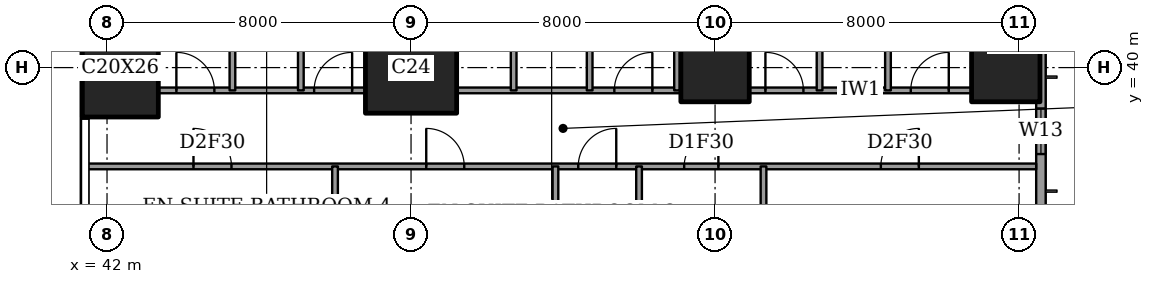
"""IFC4 building model, lengths in metres.
Left out: names, types, materials, properties, quantities, classifications, styles, units other than length and angle.
Written with IfcOpenShell. Run it as: python <this file> out.ifc"""

import sys

from ifc_helpers import new_model, si_unit, direction, frame, frame_2d, origin, origin_2d, place, context, subcontext, project, spatial, rectangle, extrude, element, fill, save


model = new_model("IFC4")
c1 = context("Model", 3, precision=1e-05, world=origin(), true_north=direction((0.0, 1.0)))
c2 = subcontext(c1, "Body", "Model", "MODEL_VIEW")
j1 = project(units=[si_unit("LENGTHUNIT", "METRE"), si_unit("PLANEANGLEUNIT", "RADIAN")], contexts=[c1])
p1 = place(None, origin())
s1 = spatial("IfcSite", under=j1, at=p1, CompositionType="ELEMENT")
p2 = place(p1, origin())
s2 = spatial("IfcBuilding", under=s1, at=p2, CompositionType="ELEMENT")
p3 = place(p2, frame((0.0, 0.0, 193.0)))
s3 = spatial("IfcBuildingStorey", under=s2, at=p3, CompositionType="ELEMENT", Elevation=193.0)
p4 = place(p3, frame((42.35, 40.0, 0.0), z_axis=(0.0, 0.0, 1.0), x_axis=(1.0, 0.0, 0.0)))
e1 = element("IfcColumn", 1, at=p4, inside=s3, PredefinedType="COLUMN", context=c2, shape_type="SweptSolid", body=[
    extrude(rectangle(XDim=2.0, YDim=2.6, at=origin_2d()), origin(), (0.0, 0.0, 1.0), 3.6),
])
p5 = place(p3, frame((50.0, 40.0, 0.0), z_axis=(0.0, 0.0, 1.0), x_axis=(1.0, 0.0, 0.0)))
e2 = element("IfcColumn", 2, at=p5, inside=s3, PredefinedType="COLUMN", context=c2, shape_type="SweptSolid", body=[
    extrude(rectangle(XDim=2.4, YDim=2.4, at=origin_2d()), origin(), (0.0, 0.0, 1.0), 3.6),
])
for number, where, z_axis, x_axis in (
    (3, (58.0, 40.0, 0.0), (0.0, 0.0, 1.0), (1.0, 0.0, 0.0)),
    (4, (65.65, 40.0, 0.0), (0.0, 0.0, 1.0), (1.0, 0.0, 0.0)),
):
    element("IfcColumn", number, at=place(p3, frame(where, z_axis=z_axis, x_axis=x_axis)), inside=s3, PredefinedType="COLUMN", context=c2, shape_type="SweptSolid", body=[
        extrude(rectangle(XDim=1.8, YDim=1.8, at=origin_2d()), origin(), (0.0, 0.0, 1.0), 3.6),
    ])
p6 = place(p3, frame((66.575, 3.175, 0.0), z_axis=(0.0, 0.0, 1.0), x_axis=(0.0, 1.0, 0.0)))
e5 = element("IfcWall", 5, at=p6, inside=s3, PredefinedType="SOLIDWALL", context=c2, shape_type="SweptSolid", body=[
    extrude(rectangle(XDim=41.65, YDim=0.25, at=frame_2d((20.825, 0.0))), origin(), (0.0, 0.0, 1.0), 3.6),
])
p7 = place(p6, frame((0.825, 0.0, 0.2)))
e6 = element("IfcOpeningElement", 6, at=p7, cuts=e5, PredefinedType="OPENING", context=c2, shape_type="SweptSolid", body=[
    extrude(rectangle(XDim=2.4, YDim=2.4, at=frame_2d((1.2, 1.2))), frame((0.0, 0.135, 0.0), z_axis=(0.0, -1.0, 0.0), x_axis=(1.0, 0.0, 0.0)), (0.0, 0.0, 1.0), 0.27),
])
p8 = place(p6, frame((6.05, 0.0, 0.2)))
e7 = element("IfcOpeningElement", 7, at=p8, cuts=e5, PredefinedType="OPENING", context=c2, shape_type="SweptSolid", body=[
    extrude(rectangle(XDim=1.2, YDim=2.4, at=frame_2d((0.6, 1.2))), frame((0.0, 0.135, 0.0), z_axis=(0.0, -1.0, 0.0), x_axis=(1.0, 0.0, 0.0)), (0.0, 0.0, 1.0), 0.27),
])
p9 = place(p6, frame((8.475, 0.0, 0.2)))
e8 = element("IfcOpeningElement", 8, at=p9, cuts=e5, PredefinedType="OPENING", context=c2, shape_type="SweptSolid", body=[
    extrude(rectangle(XDim=2.4, YDim=2.4, at=frame_2d((1.2, 1.2))), frame((0.0, 0.135, 0.0), z_axis=(0.0, -1.0, 0.0), x_axis=(1.0, 0.0, 0.0)), (0.0, 0.0, 1.0), 0.27),
])
p10 = place(p6, frame((15.675, 0.0, 0.2)))
e9 = element("IfcOpeningElement", 9, at=p10, cuts=e5, PredefinedType="OPENING", context=c2, shape_type="SweptSolid", body=[
    extrude(rectangle(XDim=2.4, YDim=2.4, at=frame_2d((1.2, 1.2))), frame((0.0, 0.135, 0.0), z_axis=(0.0, -1.0, 0.0), x_axis=(1.0, 0.0, 0.0)), (0.0, 0.0, 1.0), 0.27),
])
p11 = place(p6, frame((23.625, 0.0, 0.2)))
e10 = element("IfcOpeningElement", 10, at=p11, cuts=e5, PredefinedType="OPENING", context=c2, shape_type="SweptSolid", body=[
    extrude(rectangle(XDim=2.4, YDim=2.4, at=frame_2d((1.2, 1.2))), frame((0.0, 0.135, 0.0), z_axis=(0.0, -1.0, 0.0), x_axis=(1.0, 0.0, 0.0)), (0.0, 0.0, 1.0), 0.27),
])
p12 = place(p6, frame((30.775, 0.0, 0.2)))
e11 = element("IfcOpeningElement", 11, at=p12, cuts=e5, PredefinedType="OPENING", context=c2, shape_type="SweptSolid", body=[
    extrude(rectangle(XDim=2.4, YDim=2.4, at=frame_2d((1.2, 1.2))), frame((0.0, 0.135, 0.0), z_axis=(0.0, -1.0, 0.0), x_axis=(1.0, 0.0, 0.0)), (0.0, 0.0, 1.0), 0.27),
])
p13 = place(p6, frame((34.55, 0.0, 0.2)))
e12 = element("IfcOpeningElement", 12, at=p13, cuts=e5, PredefinedType="OPENING", context=c2, shape_type="SweptSolid", body=[
    extrude(rectangle(XDim=1.2, YDim=2.4, at=frame_2d((0.6, 1.2))), frame((0.0, 0.135, 0.0), z_axis=(0.0, -1.0, 0.0), x_axis=(1.0, 0.0, 0.0)), (0.0, 0.0, 1.0), 0.27),
])
p14 = place(p6, frame((38.425, 0.0, 0.2)))
e13 = element("IfcOpeningElement", 13, at=p14, cuts=e5, PredefinedType="OPENING", context=c2, shape_type="SweptSolid", body=[
    extrude(rectangle(XDim=2.4, YDim=2.4, at=frame_2d((1.2, 1.2))), frame((0.0, 0.135, 0.0), z_axis=(0.0, -1.0, 0.0), x_axis=(1.0, 0.0, 0.0)), (0.0, 0.0, 1.0), 0.27),
])
p15 = place(p3, frame((41.439, 37.4, 0.0), z_axis=(0.0, 0.0, 1.0), x_axis=(1.0, 0.0, 0.0)))
e14 = element("IfcWall", 14, at=p15, inside=s3, PredefinedType="PARTITIONING", context=c2, shape_type="SweptSolid", body=[
    extrude(rectangle(XDim=25.011, YDim=0.15, at=frame_2d((12.505, 0.0))), origin(), (0.0, 0.0, 1.0), 3.35),
])
p16 = place(p15, frame((12.961, 0.0, 0.0)))
e15 = element("IfcOpeningElement", 15, at=p16, cuts=e14, PredefinedType="OPENING", context=c2, shape_type="SweptSolid", body=[
    extrude(rectangle(XDim=1.0, YDim=2.1, at=frame_2d((0.5, 1.05))), frame((0.0, 0.085, 0.0), z_axis=(0.0, -1.0, 0.0), x_axis=(1.0, 0.0, 0.0)), (0.0, 0.0, 1.0), 0.17),
])
p17 = place(p15, frame((20.924, 0.0, 0.0)))
e16 = element("IfcOpeningElement", 16, at=p17, cuts=e14, PredefinedType="OPENING", context=c2, shape_type="SweptSolid", body=[
    extrude(rectangle(XDim=1.0, YDim=2.1, at=frame_2d((0.5, 1.05))), frame((0.0, 0.085, 0.0), z_axis=(0.0, -1.0, 0.0), x_axis=(1.0, 0.0, 0.0)), (0.0, 0.0, 1.0), 0.17),
])
p18 = place(p15, frame((15.749, 0.0, 0.0)))
e17 = element("IfcOpeningElement", 17, at=p18, cuts=e14, PredefinedType="OPENING", context=c2, shape_type="SweptSolid", body=[
    extrude(rectangle(XDim=0.9, YDim=2.1, at=frame_2d((0.45, 1.05))), frame((0.0, 0.085, 0.0), z_axis=(0.0, -1.0, 0.0), x_axis=(1.0, 0.0, 0.0)), (0.0, 0.0, 1.0), 0.17),
])
p19 = place(p15, frame((8.961, 0.0, 0.0)))
e18 = element("IfcOpeningElement", 18, at=p19, cuts=e14, PredefinedType="OPENING", context=c2, shape_type="SweptSolid", body=[
    extrude(rectangle(XDim=1.0, YDim=2.1, at=frame_2d((0.5, 1.05))), frame((0.0, 0.085, 0.0), z_axis=(0.0, -1.0, 0.0), x_axis=(1.0, 0.0, 0.0)), (0.0, 0.0, 1.0), 0.17),
])
p20 = place(p15, frame((2.836, 0.0, 0.0)))
e19 = element("IfcOpeningElement", 19, at=p20, cuts=e14, PredefinedType="OPENING", context=c2, shape_type="SweptSolid", body=[
    extrude(rectangle(XDim=1.0, YDim=2.1, at=frame_2d((0.5, 1.05))), frame((0.0, 0.085, 0.0), z_axis=(0.0, -1.0, 0.0), x_axis=(1.0, 0.0, 0.0)), (0.0, 0.0, 1.0), 0.17),
])
p21 = place(p3, frame((43.35, 39.4, 0.0), z_axis=(0.0, 0.0, 1.0), x_axis=(1.0, 0.0, 0.0)))
e20 = element("IfcWall", 20, at=p21, inside=s3, PredefinedType="PARTITIONING", context=c2, shape_type="SweptSolid", body=[
    extrude(rectangle(XDim=5.45, YDim=0.15, at=frame_2d((2.725, 0.0))), origin(), (0.0, 0.0, 1.0), 3.35),
])
p22 = place(p21, frame((4.1, 0.0, 0.0)))
e21 = element("IfcOpeningElement", 21, at=p22, cuts=e20, PredefinedType="OPENING", context=c2, shape_type="SweptSolid", body=[
    extrude(rectangle(XDim=1.0, YDim=2.1, at=frame_2d((0.5, 1.05))), frame((0.0, 0.085, 0.0), z_axis=(0.0, -1.0, 0.0), x_axis=(1.0, 0.0, 0.0)), (0.0, 0.0, 1.0), 0.17),
])
p23 = place(p21, frame((0.475, 0.0, 0.0)))
e22 = element("IfcOpeningElement", 22, at=p23, cuts=e20, PredefinedType="OPENING", context=c2, shape_type="SweptSolid", body=[
    extrude(rectangle(XDim=1.0, YDim=2.1, at=frame_2d((0.5, 1.05))), frame((0.0, 0.085, 0.0), z_axis=(0.0, -1.0, 0.0), x_axis=(1.0, 0.0, 0.0)), (0.0, 0.0, 1.0), 0.17),
])
p24 = place(p3, frame((51.2, 39.4, 0.0), z_axis=(0.0, 0.0, 1.0), x_axis=(1.0, 0.0, 0.0)))
e23 = element("IfcWall", 23, at=p24, inside=s3, PredefinedType="PARTITIONING", context=c2, shape_type="SweptSolid", body=[
    extrude(rectangle(XDim=5.9, YDim=0.15, at=frame_2d((2.95, 0.0))), origin(), (0.0, 0.0, 1.0), 3.35),
])
p25 = place(p24, frame((4.15, 0.0, 0.0)))
e24 = element("IfcOpeningElement", 24, at=p25, cuts=e23, PredefinedType="OPENING", context=c2, shape_type="SweptSolid", body=[
    extrude(rectangle(XDim=1.0, YDim=2.1, at=frame_2d((0.5, 1.05))), frame((0.0, 0.085, 0.0), z_axis=(0.0, -1.0, 0.0), x_axis=(1.0, 0.0, 0.0)), (0.0, 0.0, 1.0), 0.17),
])
p26 = place(p3, frame((58.9, 39.4, 0.0), z_axis=(0.0, 0.0, 1.0), x_axis=(1.0, 0.0, 0.0)))
e25 = element("IfcWall", 25, at=p26, inside=s3, PredefinedType="PARTITIONING", context=c2, shape_type="SweptSolid", body=[
    extrude(rectangle(XDim=5.85, YDim=0.15, at=frame_2d((2.925, 0.0))), origin(), (0.0, 0.0, 1.0), 3.35),
])
p27 = place(p26, frame((4.25, 0.0, 0.0)))
e26 = element("IfcOpeningElement", 26, at=p27, cuts=e25, PredefinedType="OPENING", context=c2, shape_type="SweptSolid", body=[
    extrude(rectangle(XDim=1.0, YDim=2.1, at=frame_2d((0.5, 1.05))), frame((0.0, 0.085, 0.0), z_axis=(0.0, -1.0, 0.0), x_axis=(1.0, 0.0, 0.0)), (0.0, 0.0, 1.0), 0.17),
])
p28 = place(p26, frame((0.425, 0.0, 0.0)))
e27 = element("IfcOpeningElement", 27, at=p28, cuts=e25, PredefinedType="OPENING", context=c2, shape_type="SweptSolid", body=[
    extrude(rectangle(XDim=1.0, YDim=2.1, at=frame_2d((0.5, 1.05))), frame((0.0, 0.085, 0.0), z_axis=(0.0, -1.0, 0.0), x_axis=(1.0, 0.0, 0.0)), (0.0, 0.0, 1.0), 0.17),
])
p29 = place(p3, frame((45.3, 39.4, 0.0), z_axis=(0.0, 0.0, 1.0), x_axis=(0.0, 1.0, 0.0)))
e28 = element("IfcWall", 28, at=p29, inside=s3, PredefinedType="PARTITIONING", context=c2, shape_type="SweptSolid", body=[
    extrude(rectangle(XDim=9.05, YDim=0.15, at=frame_2d((4.525, 0.0))), origin(), (0.0, 0.0, 1.0), 3.35),
])
p30 = place(p3, frame((47.1, 39.4, 0.0), z_axis=(0.0, 0.0, 1.0), x_axis=(0.0, 1.0, 0.0)))
e29 = element("IfcWall", 29, at=p30, inside=s3, PredefinedType="PARTITIONING", context=c2, shape_type="SweptSolid", body=[
    extrude(rectangle(XDim=3.5, YDim=0.15, at=frame_2d((1.75, 0.0))), origin(), (0.0, 0.0, 1.0), 3.35),
])
p31 = place(p30, frame((1.3, 0.0, 0.0)))
e30 = element("IfcOpeningElement", 30, at=p31, cuts=e29, PredefinedType="OPENING", context=c2, shape_type="SweptSolid", body=[
    extrude(rectangle(XDim=0.9, YDim=2.1, at=frame_2d((0.45, 1.05))), frame((0.0, 0.085, 0.0), z_axis=(0.0, -1.0, 0.0), x_axis=(1.0, 0.0, 0.0)), (0.0, 0.0, 1.0), 0.17),
])
p32 = place(p3, frame((48.0, 28.0, 0.0), z_axis=(0.0, 0.0, 1.0), x_axis=(0.0, 1.0, 0.0)))
e31 = element("IfcWall", 31, at=p32, inside=s3, PredefinedType="PARTITIONING", context=c2, shape_type="SweptSolid", body=[
    extrude(rectangle(XDim=9.4, YDim=0.15, at=frame_2d((4.7, 0.0))), origin(), (0.0, 0.0, 1.0), 3.35),
])
p33 = place(p32, frame((0.837, 0.0, 0.0)))
e32 = element("IfcOpeningElement", 32, at=p33, cuts=e31, PredefinedType="OPENING", context=c2, shape_type="SweptSolid", body=[
    extrude(rectangle(XDim=1.0, YDim=2.1, at=frame_2d((0.5, 1.05))), frame((0.0, 0.085, 0.0), z_axis=(0.0, -1.0, 0.0), x_axis=(1.0, 0.0, 0.0)), (0.0, 0.0, 1.0), 0.17),
])
p34 = place(p3, frame((52.7, 39.4, 0.0), z_axis=(0.0, 0.0, 1.0), x_axis=(0.0, 1.0, 0.0)))
e33 = element("IfcWall", 33, at=p34, inside=s3, PredefinedType="PARTITIONING", context=c2, shape_type="SweptSolid", body=[
    extrude(rectangle(XDim=9.05, YDim=0.15, at=frame_2d((4.525, 0.0))), origin(), (0.0, 0.0, 1.0), 3.35),
])
p35 = place(p34, frame((5.675, 0.0, 0.0)))
e34 = element("IfcOpeningElement", 34, at=p35, cuts=e33, PredefinedType="OPENING", context=c2, shape_type="SweptSolid", body=[
    extrude(rectangle(XDim=0.9, YDim=2.1, at=frame_2d((0.45, 1.05))), frame((0.0, 0.085, 0.0), z_axis=(0.0, -1.0, 0.0), x_axis=(1.0, 0.0, 0.0)), (0.0, 0.0, 1.0), 0.17),
])
p36 = place(p3, frame((53.8, 30.675, 0.0), z_axis=(0.0, 0.0, 1.0), x_axis=(0.0, 1.0, 0.0)))
e35 = element("IfcWall", 35, at=p36, inside=s3, PredefinedType="PARTITIONING", context=c2, shape_type="SweptSolid", body=[
    extrude(rectangle(XDim=6.725, YDim=0.15, at=frame_2d((3.362, 0.0))), origin(), (0.0, 0.0, 1.0), 3.35),
])
p37 = place(p3, frame((54.7, 39.4, 0.0), z_axis=(0.0, 0.0, 1.0), x_axis=(0.0, 1.0, 0.0)))
e36 = element("IfcWall", 36, at=p37, inside=s3, PredefinedType="PARTITIONING", context=c2, shape_type="SweptSolid", body=[
    extrude(rectangle(XDim=3.2, YDim=0.15, at=frame_2d((1.6, 0.0))), origin(), (0.0, 0.0, 1.0), 3.35),
])
p38 = place(p37, frame((1.15, 0.0, 0.0)))
e37 = element("IfcOpeningElement", 37, at=p38, cuts=e36, PredefinedType="OPENING", context=c2, shape_type="SweptSolid", body=[
    extrude(rectangle(XDim=0.9, YDim=2.1, at=frame_2d((0.45, 1.05))), frame((0.0, 0.085, 0.0), z_axis=(0.0, -1.0, 0.0), x_axis=(1.0, 0.0, 0.0)), (0.0, 0.0, 1.0), 0.17),
])
p39 = place(p3, frame((56.0, 28.0, 0.0), z_axis=(0.0, 0.0, 1.0), x_axis=(0.0, 1.0, 0.0)))
e38 = element("IfcWall", 38, at=p39, inside=s3, PredefinedType="PARTITIONING", context=c2, shape_type="SweptSolid", body=[
    extrude(rectangle(XDim=9.4, YDim=0.15, at=frame_2d((4.7, 0.0))), origin(), (0.0, 0.0, 1.0), 3.35),
])
p40 = place(p39, frame((0.837, 0.0, 0.0)))
e39 = element("IfcOpeningElement", 39, at=p40, cuts=e38, PredefinedType="OPENING", context=c2, shape_type="SweptSolid", body=[
    extrude(rectangle(XDim=1.0, YDim=2.1, at=frame_2d((0.5, 1.05))), frame((0.0, 0.085, 0.0), z_axis=(0.0, -1.0, 0.0), x_axis=(1.0, 0.0, 0.0)), (0.0, 0.0, 1.0), 0.17),
])
p41 = place(p3, frame((57.0, 39.4, 0.0), z_axis=(0.0, 0.0, 1.0), x_axis=(0.0, 1.0, 0.0)))
e40 = element("IfcWall", 40, at=p41, inside=s3, PredefinedType="PARTITIONING", context=c2, shape_type="SweptSolid", body=[
    extrude(rectangle(XDim=9.05, YDim=0.15, at=frame_2d((4.525, 0.0))), origin(), (0.0, 0.0, 1.0), 3.35),
])
p42 = place(p3, frame((59.275, 33.2, 0.0), z_axis=(0.0, 0.0, 1.0), x_axis=(0.0, 1.0, 0.0)))
e41 = element("IfcWall", 41, at=p42, inside=s3, PredefinedType="PARTITIONING", context=c2, shape_type="SweptSolid", body=[
    extrude(rectangle(XDim=4.2, YDim=0.15, at=frame_2d((2.1, 0.0))), origin(), (0.0, 0.0, 1.0), 3.35),
])
p43 = place(p3, frame((60.75, 39.4, 0.0), z_axis=(0.0, 0.0, 1.0), x_axis=(0.0, 1.0, 0.0)))
e42 = element("IfcWall", 42, at=p43, inside=s3, PredefinedType="PARTITIONING", context=c2, shape_type="SweptSolid", body=[
    extrude(rectangle(XDim=9.05, YDim=0.15, at=frame_2d((4.525, 0.0))), origin(), (0.0, 0.0, 1.0), 3.35),
])
p44 = place(p3, frame((62.55, 39.4, 0.0), z_axis=(0.0, 0.0, 1.0), x_axis=(0.0, 1.0, 0.0)))
e43 = element("IfcWall", 43, at=p44, inside=s3, PredefinedType="PARTITIONING", context=c2, shape_type="SweptSolid", body=[
    extrude(rectangle(XDim=3.5, YDim=0.15, at=frame_2d((1.75, 0.0))), origin(), (0.0, 0.0, 1.0), 3.35),
])
p45 = place(p44, frame((1.3, 0.0, 0.0)))
e44 = element("IfcOpeningElement", 44, at=p45, cuts=e43, PredefinedType="OPENING", context=c2, shape_type="SweptSolid", body=[
    extrude(rectangle(XDim=0.9, YDim=2.1, at=frame_2d((0.45, 1.05))), frame((0.0, 0.085, 0.0), z_axis=(0.0, -1.0, 0.0), x_axis=(1.0, 0.0, 0.0)), (0.0, 0.0, 1.0), 0.17),
])
p46 = place(p13, origin())
e45 = element("IfcWindow", 45, at=p46, inside=s3, PartitioningType="SINGLE_PANEL", PredefinedType="WINDOW", context=c2, shape_type="SweptSolid", body=[
    extrude(rectangle(XDim=1.2, YDim=2.4, at=frame_2d((0.6, 1.2))), frame((0.0, 0.03, 0.0), z_axis=(0.0, -1.0, 0.0), x_axis=(1.0, 0.0, 0.0)), (0.0, 0.0, 1.0), 0.06),
])
fill(e12, e45)
p47 = place(p27, origin())
e46 = element("IfcDoor", 46, at=p47, inside=s3, OperationType="SINGLE_SWING_LEFT", PredefinedType="DOOR", context=c2, shape_type="SweptSolid", body=[
    extrude(rectangle(XDim=1.0, YDim=2.1, at=frame_2d((0.5, 1.05))), frame((0.0, 0.025, 0.0), z_axis=(0.0, -1.0, 0.0), x_axis=(1.0, 0.0, 0.0)), (0.0, 0.0, 1.0), 0.05),
])
fill(e26, e46)
p48 = place(p28, origin())
e47 = element("IfcDoor", 47, at=p48, inside=s3, OperationType="SINGLE_SWING_RIGHT", PredefinedType="DOOR", context=c2, shape_type="SweptSolid", body=[
    extrude(rectangle(XDim=1.0, YDim=2.1, at=frame_2d((0.5, 1.05))), frame((0.0, 0.025, 0.0), z_axis=(0.0, -1.0, 0.0), x_axis=(1.0, 0.0, 0.0)), (0.0, 0.0, 1.0), 0.05),
])
fill(e27, e47)
p49 = place(p25, origin())
e48 = element("IfcDoor", 48, at=p49, inside=s3, OperationType="SINGLE_SWING_LEFT", PredefinedType="DOOR", context=c2, shape_type="SweptSolid", body=[
    extrude(rectangle(XDim=1.0, YDim=2.1, at=frame_2d((0.5, 1.05))), frame((0.0, 0.025, 0.0), z_axis=(0.0, -1.0, 0.0), x_axis=(1.0, 0.0, 0.0)), (0.0, 0.0, 1.0), 0.05),
])
fill(e24, e48)
p50 = place(p22, origin())
e49 = element("IfcDoor", 49, at=p50, inside=s3, OperationType="SINGLE_SWING_LEFT", PredefinedType="DOOR", context=c2, shape_type="SweptSolid", body=[
    extrude(rectangle(XDim=1.0, YDim=2.1, at=frame_2d((0.5, 1.05))), frame((0.0, 0.025, 0.0), z_axis=(0.0, -1.0, 0.0), x_axis=(1.0, 0.0, 0.0)), (0.0, 0.0, 1.0), 0.05),
])
fill(e21, e49)
p51 = place(p23, origin())
e50 = element("IfcDoor", 50, at=p51, inside=s3, OperationType="SINGLE_SWING_RIGHT", PredefinedType="DOOR", context=c2, shape_type="SweptSolid", body=[
    extrude(rectangle(XDim=1.0, YDim=2.1, at=frame_2d((0.5, 1.05))), frame((0.0, 0.025, 0.0), z_axis=(0.0, -1.0, 0.0), x_axis=(1.0, 0.0, 0.0)), (0.0, 0.0, 1.0), 0.05),
])
fill(e22, e50)
p52 = place(p16, origin())
e51 = element("IfcDoor", 51, at=p52, inside=s3, OperationType="SINGLE_SWING_LEFT", PredefinedType="DOOR", context=c2, shape_type="SweptSolid", body=[
    extrude(rectangle(XDim=1.0, YDim=2.1, at=frame_2d((0.5, 1.05))), frame((0.0, 0.025, 0.0), z_axis=(0.0, -1.0, 0.0), x_axis=(1.0, 0.0, 0.0)), (0.0, 0.0, 1.0), 0.05),
])
fill(e15, e51)
p53 = place(p17, origin())
e52 = element("IfcDoor", 52, at=p53, inside=s3, OperationType="SINGLE_SWING_LEFT", PredefinedType="DOOR", context=c2, shape_type="SweptSolid", body=[
    extrude(rectangle(XDim=1.0, YDim=2.1, at=frame_2d((0.5, 1.05))), frame((0.0, 0.025, 0.0), z_axis=(0.0, -1.0, 0.0), x_axis=(1.0, 0.0, 0.0)), (0.0, 0.0, 1.0), 0.05),
])
fill(e16, e52)
p54 = place(p18, origin())
e53 = element("IfcDoor", 53, at=p54, inside=s3, OperationType="SINGLE_SWING_LEFT", PredefinedType="DOOR", context=c2, shape_type="SweptSolid", body=[
    extrude(rectangle(XDim=0.9, YDim=2.1, at=frame_2d((0.45, 1.05))), frame((0.0, 0.025, 0.0), z_axis=(0.0, -1.0, 0.0), x_axis=(1.0, 0.0, 0.0)), (0.0, 0.0, 1.0), 0.05),
])
fill(e17, e53)
p55 = place(p19, origin())
e54 = element("IfcDoor", 54, at=p55, inside=s3, OperationType="SINGLE_SWING_RIGHT", PredefinedType="DOOR", context=c2, shape_type="SweptSolid", body=[
    extrude(rectangle(XDim=1.0, YDim=2.1, at=frame_2d((0.5, 1.05))), frame((0.0, 0.025, 0.0), z_axis=(0.0, -1.0, 0.0), x_axis=(1.0, 0.0, 0.0)), (0.0, 0.0, 1.0), 0.05),
])
fill(e18, e54)
p56 = place(p20, origin())
e55 = element("IfcDoor", 55, at=p56, inside=s3, OperationType="SINGLE_SWING_RIGHT", PredefinedType="DOOR", context=c2, shape_type="SweptSolid", body=[
    extrude(rectangle(XDim=1.0, YDim=2.1, at=frame_2d((0.5, 1.05))), frame((0.0, 0.025, 0.0), z_axis=(0.0, -1.0, 0.0), x_axis=(1.0, 0.0, 0.0)), (0.0, 0.0, 1.0), 0.05),
])
fill(e19, e55)
save(model, sys.argv[1])
